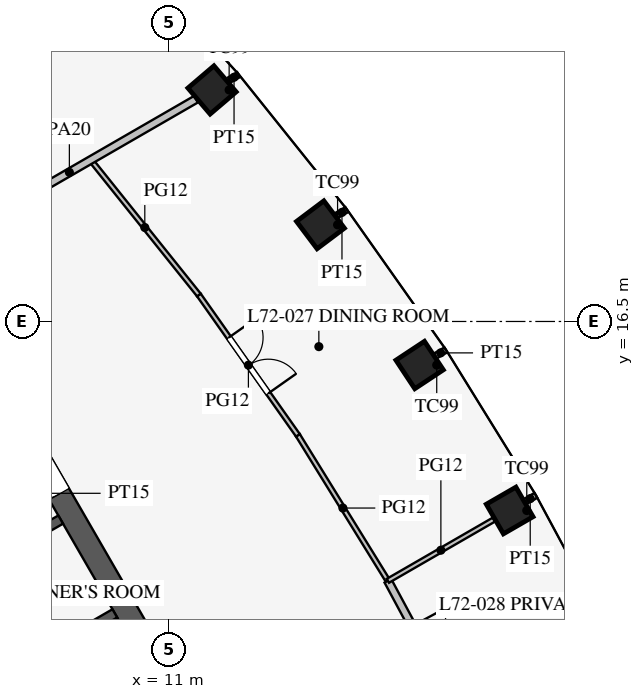
"""IFC4 building model, lengths in metres.
Left out: names, types, materials, properties, quantities, classifications, styles, units other than length and angle.
Written with IfcOpenShell. Run it as: python <this file> out.ifc"""

import sys

from ifc_helpers import new_model, si_unit, direction, frame, frame_2d, origin, origin_2d, place, context, subcontext, project, spatial, rectangle, extrude, element, fill, save


model = new_model("IFC4")
c1 = context("Model", 3, precision=1e-05, world=origin(), true_north=direction((0.0, 1.0)))
c2 = subcontext(c1, "Body", "Model", "MODEL_VIEW")
j1 = project(units=[si_unit("LENGTHUNIT", "METRE"), si_unit("PLANEANGLEUNIT", "RADIAN")], contexts=[c1])
p1 = place(None, origin())
s1 = spatial("IfcSite", under=j1, at=p1, CompositionType="ELEMENT")
p2 = place(p1, origin())
s2 = spatial("IfcBuilding", under=s1, at=p2, CompositionType="ELEMENT")
p3 = place(p2, frame((0.0, 0.0, 314.1)))
s3 = spatial("IfcBuildingStorey", under=s2, at=p3, CompositionType="ELEMENT", Elevation=314.1)
for number, where, z_axis, x_axis in (
    (1, (19.963, 11.526, 0.0), (0.0, 0.0, 1.0), (-0.5, 0.866, 0.0)),
    (2, (17.594, 15.354, 0.0), (0.0, 0.0, 1.0), (-0.552, 0.834, 0.0)),
    (3, (14.985, 19.044, 0.0), (0.0, 0.0, 1.0), (-0.601, 0.799, 0.0)),
    (4, (12.132, 22.593, 0.0), (0.0, 0.0, 1.0), (-0.649, 0.761, 0.0)),
):
    element("IfcColumn", number, at=place(p3, frame(where, z_axis=z_axis, x_axis=x_axis)), inside=s3, PredefinedType="COLUMN", context=c2, shape_type="SweptSolid", body=[
        extrude(rectangle(XDim=0.9, YDim=0.9, at=origin_2d()), origin(), (0.0, 0.0, 1.0), 4.2),
    ])
p4 = place(p3, frame((16.743, -3.0, 0.0), z_axis=(0.0, 0.0, 1.0), x_axis=(-0.500002442456, 0.866023993627, 0.0)))
e5 = element("IfcWall", 5, at=p4, inside=s3, PredefinedType="SHEAR", context=c2, shape_type="SweptSolid", body=[
    extrude(rectangle(XDim=21.939, YDim=0.6, at=frame_2d((10.97, 0.0))), origin(), (0.0, 0.0, 1.0), 4.2),
])
p5 = place(p4, frame((17.27, 0.0, 0.0)))
e6 = element("IfcOpeningElement", 6, at=p5, cuts=e5, PredefinedType="OPENING", context=c2, shape_type="SweptSolid", body=[
    extrude(rectangle(XDim=1.2, YDim=2.1, at=frame_2d((0.6, 1.05))), frame((0.0, 0.31, 0.0), z_axis=(0.0, -1.0, 0.0), x_axis=(1.0, 0.0, 0.0)), (0.0, 0.0, 1.0), 0.62),
])
p6 = place(p4, frame((3.47, 0.0, 0.0)))
e7 = element("IfcOpeningElement", 7, at=p6, cuts=e5, PredefinedType="OPENING", context=c2, shape_type="SweptSolid", body=[
    extrude(rectangle(XDim=1.2, YDim=2.1, at=frame_2d((0.6, 1.05))), frame((0.0, 0.31, 0.0), z_axis=(0.0, -1.0, 0.0), x_axis=(1.0, 0.0, 0.0)), (0.0, 0.0, 1.0), 0.62),
])
p7 = place(p3, frame((11.424, 0.014, 0.0), z_axis=(0.0, 0.0, 1.0), x_axis=(-0.500001763848, 0.866024385424, 0.0)))
e8 = element("IfcWall", 8, at=p7, inside=s3, PredefinedType="SHEAR", context=c2, shape_type="SweptSolid", body=[
    extrude(rectangle(XDim=11.4, YDim=0.25, at=frame_2d((5.7, 0.0))), origin(), (0.0, 0.0, 1.0), 4.2),
])
p8 = place(p7, frame((0.975, 0.0, 0.0)))
e9 = element("IfcOpeningElement", 9, at=p8, cuts=e8, PredefinedType="OPENING", context=c2, shape_type="SweptSolid", body=[
    extrude(rectangle(XDim=0.9, YDim=2.1, at=frame_2d((0.45, 1.05))), frame((0.0, 0.135, 0.0), z_axis=(0.0, -1.0, 0.0), x_axis=(1.0, 0.0, 0.0)), (0.0, 0.0, 1.0), 0.27),
])
p9 = place(p7, frame((3.825, 0.0, 0.0)))
e10 = element("IfcOpeningElement", 10, at=p9, cuts=e8, PredefinedType="OPENING", context=c2, shape_type="SweptSolid", body=[
    extrude(rectangle(XDim=0.9, YDim=2.1, at=frame_2d((0.45, 1.05))), frame((0.0, 0.135, 0.0), z_axis=(0.0, -1.0, 0.0), x_axis=(1.0, 0.0, 0.0)), (0.0, 0.0, 1.0), 0.27),
])
p10 = place(p7, frame((6.675, 0.0, 0.0)))
e11 = element("IfcOpeningElement", 11, at=p10, cuts=e8, PredefinedType="OPENING", context=c2, shape_type="SweptSolid", body=[
    extrude(rectangle(XDim=0.9, YDim=2.1, at=frame_2d((0.45, 1.05))), frame((0.0, 0.135, 0.0), z_axis=(0.0, -1.0, 0.0), x_axis=(1.0, 0.0, 0.0)), (0.0, 0.0, 1.0), 0.27),
])
p11 = place(p7, frame((9.525, 0.0, 0.0)))
e12 = element("IfcOpeningElement", 12, at=p11, cuts=e8, PredefinedType="OPENING", context=c2, shape_type="SweptSolid", body=[
    extrude(rectangle(XDim=0.9, YDim=2.1, at=frame_2d((0.45, 1.05))), frame((0.0, 0.135, 0.0), z_axis=(0.0, -1.0, 0.0), x_axis=(1.0, 0.0, 0.0)), (0.0, 0.0, 1.0), 0.27),
])
for number, where, z_axis, x_axis in (
    (13, (7.257, 7.481, 0.0), (0.0, 0.0, 1.0), (0.866, 0.5, 0.0)),
    (14, (5.832, 9.949, 0.0), (0.0, 0.0, 1.0), (0.866, 0.5, 0.0)),
):
    element("IfcWall", number, at=place(p3, frame(where, z_axis=z_axis, x_axis=x_axis)), inside=s3, PredefinedType="SHEAR", context=c2, shape_type="SweptSolid", body=[
        extrude(rectangle(XDim=2.675, YDim=0.25, at=frame_2d((1.337, 0.0))), origin(), (0.0, 0.0, 1.0), 4.2),
    ])
p12 = place(p3, frame((12.589, 22.857, 0.0), z_axis=(0.0, 0.0, 1.0), x_axis=(0.865982457891, 0.500074377092, 0.0)))
e15 = element("IfcWall", 15, at=p12, inside=s3, PredefinedType="PARTITIONING", context=c2, shape_type="SweptSolid", body=[
    extrude(rectangle(XDim=0.28, YDim=0.15, at=frame_2d((0.14, 0.0))), origin(), (0.0, 0.0, 1.0), 2.9),
])
p13 = place(p3, frame((18.01, 15.594, 0.0), z_axis=(0.0, 0.0, 1.0), x_axis=(0.866095534226, 0.499878510834, 0.0)))
e16 = element("IfcWall", 16, at=p13, inside=s3, PredefinedType="PARTITIONING", context=c2, shape_type="SweptSolid", body=[
    extrude(rectangle(XDim=0.316, YDim=0.15, at=frame_2d((0.158, 0.0))), origin(), (0.0, 0.0, 1.0), 2.9),
])
p14 = place(p3, frame((15.422, 19.296, 0.0), z_axis=(0.0, 0.0, 1.0), x_axis=(0.865896854829, 0.500222587251, 0.0)))
e17 = element("IfcWall", 17, at=p14, inside=s3, PredefinedType="PARTITIONING", context=c2, shape_type="SweptSolid", body=[
    extrude(rectangle(XDim=0.296, YDim=0.15, at=frame_2d((0.148, 0.0))), origin(), (0.0, 0.0, 1.0), 2.9),
])
p15 = place(p3, frame((20.356, 11.753, 0.0), z_axis=(0.0, 0.0, 1.0), x_axis=(0.865899514186, 0.500217983815, 0.0)))
e18 = element("IfcWall", 18, at=p15, inside=s3, PredefinedType="PARTITIONING", context=c2, shape_type="SweptSolid", body=[
    extrude(rectangle(XDim=0.341, YDim=0.15, at=frame_2d((0.17, 0.0))), origin(), (0.0, 0.0, 1.0), 2.9),
])
p16 = place(p3, frame((16.759, 9.676, 0.0), z_axis=(0.0, 0.0, 1.0), x_axis=(-0.525996140194, 0.850486954927, 0.0)))
e19 = element("IfcWall", 19, at=p16, inside=s3, PredefinedType="PARTITIONING", context=c2, shape_type="SweptSolid", body=[
    extrude(rectangle(XDim=4.502, YDim=0.12, at=frame_2d((2.251, 0.0))), origin(), (0.0, 0.0, 1.0), 2.9),
])
p17 = place(p3, frame((14.391, 13.505, 0.0), z_axis=(0.0, 0.0, 1.0), x_axis=(-0.576562277172, 0.817053205454, 0.0)))
e20 = element("IfcWall", 20, at=p17, inside=s3, PredefinedType="PARTITIONING", context=c2, shape_type="SweptSolid", body=[
    extrude(rectangle(XDim=4.519, YDim=0.12, at=frame_2d((2.259, 0.0))), origin(), (0.0, 0.0, 1.0), 2.9),
])
p18 = place(p17, frame((1.35, 0.0, 0.15)))
e21 = element("IfcOpeningElement", 21, at=p18, cuts=e20, PredefinedType="OPENING", context=c2, shape_type="SweptSolid", body=[
    extrude(rectangle(XDim=1.8, YDim=2.1, at=frame_2d((0.9, 1.05))), frame((0.0, 0.07, 0.0), z_axis=(0.0, -1.0, 0.0), x_axis=(1.0, 0.0, 0.0)), (0.0, 0.0, 1.0), 0.14),
])
p19 = place(p3, frame((11.786, 17.197, 0.0), z_axis=(0.0, 0.0, 1.0), x_axis=(-0.625263875383, 0.780413407202, 0.0)))
e22 = element("IfcWall", 22, at=p19, inside=s3, PredefinedType="PARTITIONING", context=c2, shape_type="SweptSolid", body=[
    extrude(rectangle(XDim=4.552, YDim=0.12, at=frame_2d((2.276, 0.0))), origin(), (0.0, 0.0, 1.0), 2.9),
])
p20 = place(p3, frame((18.891, 5.71, 0.0), z_axis=(0.0, 0.0, 1.0), x_axis=(-0.473524102582, 0.880780860529, 0.0)))
e23 = element("IfcWall", 23, at=p20, inside=s3, PredefinedType="PARTITIONING", context=c2, shape_type="SweptSolid", body=[
    extrude(rectangle(XDim=4.502, YDim=0.2, at=frame_2d((2.251, 0.0))), origin(), (0.0, 0.0, 1.0), 2.9),
])
p21 = place(p20, frame((1.35, 0.0, 0.15)))
e24 = element("IfcOpeningElement", 24, at=p21, cuts=e23, PredefinedType="OPENING", context=c2, shape_type="SweptSolid", body=[
    extrude(rectangle(XDim=1.8, YDim=2.1, at=frame_2d((0.9, 1.05))), frame((0.0, 0.11, 0.0), z_axis=(0.0, -1.0, 0.0), x_axis=(1.0, 0.0, 0.0)), (0.0, 0.0, 1.0), 0.22),
])
p22 = place(p3, frame((16.759, 9.676, 0.0), z_axis=(0.0, 0.0, 1.0), x_axis=(0.866008816382, 0.500028729123, 0.0)))
e25 = element("IfcWall", 25, at=p22, inside=s3, PredefinedType="PARTITIONING", context=c2, shape_type="SweptSolid", body=[
    extrude(rectangle(XDim=3.22, YDim=0.12, at=frame_2d((1.61, 0.0))), origin(), (0.0, 0.0, 1.0), 2.9),
])
p23 = place(p3, frame((5.045, 18.501, 0.0), z_axis=(0.0, 0.0, 1.0), x_axis=(0.866043990756, 0.499967805039, 0.0)))
e26 = element("IfcWall", 26, at=p23, inside=s3, PredefinedType="PARTITIONING", context=c2, shape_type="SweptSolid", body=[
    extrude(rectangle(XDim=7.695, YDim=0.2, at=frame_2d((3.847, 0.0))), origin(), (0.0, 0.0, 1.0), 2.9),
])
p24 = place(p5, origin())
e27 = element("IfcDoor", 27, at=p24, inside=s3, OperationType="SINGLE_SWING_RIGHT", PredefinedType="DOOR", context=c2, shape_type="SweptSolid", body=[
    extrude(rectangle(XDim=1.2, YDim=2.1, at=frame_2d((0.6, 1.05))), frame((0.0, 0.025, 0.0), z_axis=(0.0, -1.0, 0.0), x_axis=(1.0, 0.0, 0.0)), (0.0, 0.0, 1.0), 0.05),
])
fill(e6, e27)
p25 = place(p18, frame((1.8, 0.0, 0.0), z_axis=(0.0, 0.0, 1.0), x_axis=(-1.0, 0.0, 0.0)))
e28 = element("IfcDoor", 28, at=p25, inside=s3, OperationType="DOUBLE_DOOR_SINGLE_SWING", PredefinedType="DOOR", context=c2, shape_type="SweptSolid", body=[
    extrude(rectangle(XDim=1.8, YDim=2.1, at=frame_2d((0.9, 1.05))), frame((0.0, 0.025, 0.0), z_axis=(0.0, -1.0, 0.0), x_axis=(1.0, 0.0, 0.0)), (0.0, 0.0, 1.0), 0.05),
])
fill(e21, e28)
save(model, sys.argv[1])
